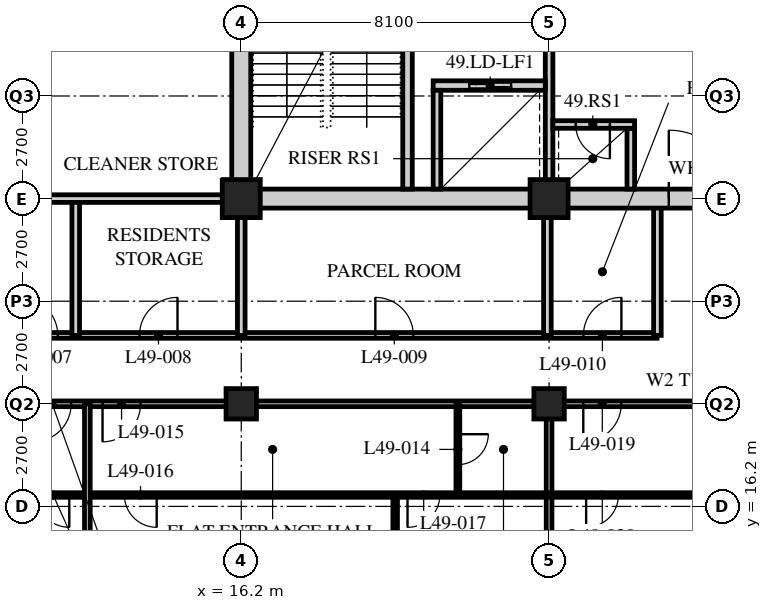
"""IFC4 building model, lengths in metres.
Left out: names, types, materials, properties, quantities, classifications, styles, units other than length and angle.
Written with IfcOpenShell. Run it as: python <this file> out.ifc"""

import sys

from ifc_helpers import new_model, si_unit, direction, frame, frame_2d, origin, origin_2d, place, context, subcontext, project, spatial, rectangle, hollow_rectangle, extrude, element, fill, save


model = new_model("IFC4")
c1 = context("Model", 3, precision=1e-05, world=origin(), true_north=direction((0.0, 1.0)))
c2 = subcontext(c1, "Body", "Model", "MODEL_VIEW")
j1 = project(units=[si_unit("LENGTHUNIT", "METRE"), si_unit("PLANEANGLEUNIT", "RADIAN")], contexts=[c1])
p1 = place(None, origin())
s1 = spatial("IfcSite", under=j1, at=p1, CompositionType="ELEMENT")
p2 = place(p1, origin())
s2 = spatial("IfcBuilding", under=s1, at=p2, CompositionType="ELEMENT")
p3 = place(p2, frame((0.0, 0.0, 192.0)))
s3 = spatial("IfcBuildingStorey", under=s2, at=p3, CompositionType="ELEMENT", Elevation=192.0)
p4 = place(p3, frame((16.2, 18.9, 0.0), z_axis=(0.0, 0.0, 1.0), x_axis=(1.0, 0.0, 0.0)))
e1 = element("IfcColumn", 1, at=p4, inside=s3, PredefinedType="COLUMN", context=c2, shape_type="SweptSolid", body=[
    extrude(hollow_rectangle(XDim=0.8, YDim=0.8, WallThickness=0.08, at=origin_2d()), origin(), (0.0, 0.0, 1.0), 3.6),
])
p5 = place(p3, frame((16.2, 24.3, 0.0), z_axis=(0.0, 0.0, 1.0), x_axis=(1.0, 0.0, 0.0)))
e2 = element("IfcColumn", 2, at=p5, inside=s3, PredefinedType="COLUMN", context=c2, shape_type="SweptSolid", body=[
    extrude(hollow_rectangle(XDim=1.0, YDim=1.0, WallThickness=0.1, at=origin_2d()), origin(), (0.0, 0.0, 1.0), 3.6),
])
p6 = place(p3, frame((24.3, 18.9, 0.0), z_axis=(0.0, 0.0, 1.0), x_axis=(1.0, 0.0, 0.0)))
e3 = element("IfcColumn", 3, at=p6, inside=s3, PredefinedType="COLUMN", context=c2, shape_type="SweptSolid", body=[
    extrude(hollow_rectangle(XDim=0.8, YDim=0.8, WallThickness=0.08, at=origin_2d()), origin(), (0.0, 0.0, 1.0), 3.6),
])
p7 = place(p3, frame((24.3, 24.3, 0.0), z_axis=(0.0, 0.0, 1.0), x_axis=(1.0, 0.0, 0.0)))
e4 = element("IfcColumn", 4, at=p7, inside=s3, PredefinedType="COLUMN", context=c2, shape_type="SweptSolid", body=[
    extrude(hollow_rectangle(XDim=1.0, YDim=1.0, WallThickness=0.1, at=origin_2d()), origin(), (0.0, 0.0, 1.0), 3.6),
])
p8 = place(p3, frame((8.1, 18.9, 0.0), z_axis=(0.0, 0.0, 1.0), x_axis=(1.0, 0.0, 0.0)))
e5 = element("IfcWall", 5, at=p8, inside=s3, PredefinedType="PARTITIONING", context=c2, shape_type="SweptSolid", body=[
    extrude(rectangle(XDim=40.5, YDim=0.15, at=frame_2d((20.25, 0.0))), origin(), (0.0, 0.0, 1.0), 2.778),
])
p9 = place(p8, frame((4.45, 0.0, 0.0)))
e6 = element("IfcOpeningElement", 6, at=p9, cuts=e5, PredefinedType="OPENING", context=c2, shape_type="SweptSolid", body=[
    extrude(rectangle(XDim=1.0, YDim=2.1, at=frame_2d((0.5, 1.05))), frame((0.0, 0.085, 0.0), z_axis=(0.0, -1.0, 0.0), x_axis=(1.0, 0.0, 0.0)), (0.0, 0.0, 1.0), 0.17),
])
p10 = place(p8, frame((17.1, 0.0, 0.0)))
e7 = element("IfcOpeningElement", 7, at=p10, cuts=e5, PredefinedType="OPENING", context=c2, shape_type="SweptSolid", body=[
    extrude(rectangle(XDim=1.0, YDim=2.1, at=frame_2d((0.5, 1.05))), frame((0.0, 0.085, 0.0), z_axis=(0.0, -1.0, 0.0), x_axis=(1.0, 0.0, 0.0)), (0.0, 0.0, 1.0), 0.17),
])
p11 = place(p8, frame((28.75, 0.0, 0.0)))
e8 = element("IfcOpeningElement", 8, at=p11, cuts=e5, PredefinedType="OPENING", context=c2, shape_type="SweptSolid", body=[
    extrude(rectangle(XDim=1.0, YDim=2.1, at=frame_2d((0.5, 1.05))), frame((0.0, 0.085, 0.0), z_axis=(0.0, -1.0, 0.0), x_axis=(1.0, 0.0, 0.0)), (0.0, 0.0, 1.0), 0.17),
])
p12 = place(p8, frame((2.625, 0.0, 0.0)))
e9 = element("IfcOpeningElement", 9, at=p12, cuts=e5, PredefinedType="OPENING", context=c2, shape_type="SweptSolid", body=[
    extrude(rectangle(XDim=1.0, YDim=2.1, at=frame_2d((0.5, 1.05))), frame((0.0, 0.085, 0.0), z_axis=(0.0, -1.0, 0.0), x_axis=(1.0, 0.0, 0.0)), (0.0, 0.0, 1.0), 0.17),
])
p13 = place(p8, frame((36.875, 0.0, 0.0)))
e10 = element("IfcOpeningElement", 10, at=p13, cuts=e5, PredefinedType="OPENING", context=c2, shape_type="SweptSolid", body=[
    extrude(rectangle(XDim=1.0, YDim=2.1, at=frame_2d((0.5, 1.05))), frame((0.0, 0.085, 0.0), z_axis=(0.0, -1.0, 0.0), x_axis=(1.0, 0.0, 0.0)), (0.0, 0.0, 1.0), 0.17),
])
p14 = place(p3, frame((9.9, 20.7, 0.0), z_axis=(0.0, 0.0, 1.0), x_axis=(1.0, 0.0, 0.0)))
e11 = element("IfcWall", 11, at=p14, inside=s3, PredefinedType="PARTITIONING", context=c2, shape_type="SweptSolid", body=[
    extrude(rectangle(XDim=17.24, YDim=0.15, at=frame_2d((8.62, 0.0))), origin(), (0.0, 0.0, 1.0), 3.39),
])
p15 = place(p14, frame((0.472, 0.0, 0.0)))
e12 = element("IfcOpeningElement", 12, at=p15, cuts=e11, PredefinedType="OPENING", context=c2, shape_type="SweptSolid", body=[
    extrude(rectangle(XDim=1.0, YDim=2.1, at=frame_2d((0.5, 1.05))), frame((0.0, 0.085, 0.0), z_axis=(0.0, -1.0, 0.0), x_axis=(1.0, 0.0, 0.0)), (0.0, 0.0, 1.0), 0.17),
])
p16 = place(p14, frame((3.622, 0.0, 0.0)))
e13 = element("IfcOpeningElement", 13, at=p16, cuts=e11, PredefinedType="OPENING", context=c2, shape_type="SweptSolid", body=[
    extrude(rectangle(XDim=1.0, YDim=2.1, at=frame_2d((0.5, 1.05))), frame((0.0, 0.085, 0.0), z_axis=(0.0, -1.0, 0.0), x_axis=(1.0, 0.0, 0.0)), (0.0, 0.0, 1.0), 0.17),
])
p17 = place(p14, frame((9.828, 0.0, 0.0)))
e14 = element("IfcOpeningElement", 14, at=p17, cuts=e11, PredefinedType="OPENING", context=c2, shape_type="SweptSolid", body=[
    extrude(rectangle(XDim=1.0, YDim=2.1, at=frame_2d((0.5, 1.05))), frame((0.0, 0.085, 0.0), z_axis=(0.0, -1.0, 0.0), x_axis=(1.0, 0.0, 0.0)), (0.0, 0.0, 1.0), 0.17),
])
p18 = place(p14, frame((15.303, 0.0, 0.0)))
e15 = element("IfcOpeningElement", 15, at=p18, cuts=e11, PredefinedType="OPENING", context=c2, shape_type="SweptSolid", body=[
    extrude(rectangle(XDim=1.0, YDim=2.1, at=frame_2d((0.5, 1.05))), frame((0.0, 0.085, 0.0), z_axis=(0.0, -1.0, 0.0), x_axis=(1.0, 0.0, 0.0)), (0.0, 0.0, 1.0), 0.17),
])
p19 = place(p3, frame((16.2, 20.7, 0.0), z_axis=(0.0, 0.0, 1.0), x_axis=(0.0, 1.0, 0.0)))
e16 = element("IfcWall", 16, at=p19, inside=s3, PredefinedType="SOLIDWALL", context=c2, shape_type="SweptSolid", body=[
    extrude(rectangle(XDim=3.6, YDim=0.2, at=frame_2d((1.8, 0.0))), origin(), (0.0, 0.0, 1.0), 2.778),
])
p20 = place(p3, frame((11.844, 20.7, 0.0), z_axis=(0.0, 0.0, 1.0), x_axis=(0.0, 1.0, 0.0)))
e17 = element("IfcWall", 17, at=p20, inside=s3, PredefinedType="SOLIDWALL", context=c2, shape_type="SweptSolid", body=[
    extrude(rectangle(XDim=3.6, YDim=0.2, at=frame_2d((1.8, 0.0))), origin(), (0.0, 0.0, 1.0), 3.39),
])
p21 = place(p3, frame((24.256, 20.7, 0.0), z_axis=(0.0, 0.0, 1.0), x_axis=(0.0, 1.0, 0.0)))
e18 = element("IfcWall", 18, at=p21, inside=s3, PredefinedType="SOLIDWALL", context=c2, shape_type="SweptSolid", body=[
    extrude(rectangle(XDim=3.6, YDim=0.2, at=frame_2d((1.8, 0.0))), origin(), (0.0, 0.0, 1.0), 2.778),
])
p22 = place(p3, frame((27.15, 20.7, 0.0), z_axis=(0.0, 0.0, 1.0), x_axis=(0.0, 1.0, 0.0)))
e19 = element("IfcWall", 19, at=p22, inside=s3, PredefinedType="SOLIDWALL", context=c2, shape_type="SweptSolid", body=[
    extrude(rectangle(XDim=3.6, YDim=0.2, at=frame_2d((1.8, 0.0))), origin(), (0.0, 0.0, 1.0), 3.39),
])
p23 = place(p3, frame((9.9, 24.3, 0.0), z_axis=(0.0, 0.0, 1.0), x_axis=(1.0, 0.0, 0.0)))
e20 = element("IfcWall", 20, at=p23, inside=s3, PredefinedType="SOLIDWALL", context=c2, shape_type="SweptSolid", body=[
    extrude(rectangle(XDim=6.3, YDim=0.2, at=frame_2d((3.15, 0.0))), origin(), (0.0, 0.0, 1.0), 3.39),
])
p24 = place(p3, frame((21.9, 18.9, 0.0), z_axis=(0.0, 0.0, 1.0), x_axis=(0.0, -1.0, 0.0)))
e21 = element("IfcWall", 21, at=p24, inside=s3, PredefinedType="PARTITIONING", context=c2, shape_type="SweptSolid", body=[
    extrude(rectangle(XDim=2.4, YDim=0.1, at=frame_2d((1.2, 0.0))), origin(), (0.0, 0.0, 1.0), 3.39),
])
p25 = place(p24, frame((0.8, 0.0, 0.0)))
e22 = element("IfcOpeningElement", 22, at=p25, cuts=e21, PredefinedType="OPENING", context=c2, shape_type="SweptSolid", body=[
    extrude(rectangle(XDim=0.8, YDim=2.1, at=frame_2d((0.4, 1.05))), frame((0.0, 0.06, 0.0), z_axis=(0.0, -1.0, 0.0), x_axis=(1.0, 0.0, 0.0)), (0.0, 0.0, 1.0), 0.12),
])
p26 = place(p3, frame((20.25, 16.5, 0.0), z_axis=(0.0, 0.0, 1.0), x_axis=(0.0, -1.0, 0.0)))
e23 = element("IfcWall", 23, at=p26, inside=s3, PredefinedType="PARTITIONING", context=c2, shape_type="SweptSolid", body=[
    extrude(rectangle(XDim=5.4, YDim=0.12, at=frame_2d((2.7, 0.0))), origin(), (0.0, 0.0, 1.0), 3.39),
])
p27 = place(p3, frame((24.3, 18.9, 0.0), z_axis=(0.0, 0.0, 1.0), x_axis=(0.0, -1.0, 0.0)))
e24 = element("IfcWall", 24, at=p27, inside=s3, PredefinedType="PARTITIONING", context=c2, shape_type="SweptSolid", body=[
    extrude(rectangle(XDim=7.8, YDim=0.15, at=frame_2d((3.9, 0.0))), origin(), (0.0, 0.0, 1.0), 2.778),
])
p28 = place(p3, frame((8.1, 16.5, 0.0), z_axis=(0.0, 0.0, 1.0), x_axis=(1.0, 0.0, 0.0)))
e25 = element("IfcWall", 25, at=p28, inside=s3, PredefinedType="PARTITIONING", context=c2, shape_type="SweptSolid", body=[
    extrude(rectangle(XDim=40.5, YDim=0.12, at=frame_2d((20.25, 0.0))), origin(), (0.0, 0.0, 1.0), 3.39),
])
p29 = place(p28, frame((5.025, 0.0, 0.0)))
e26 = element("IfcOpeningElement", 26, at=p29, cuts=e25, PredefinedType="OPENING", context=c2, shape_type="SweptSolid", body=[
    extrude(rectangle(XDim=0.85, YDim=2.1, at=frame_2d((0.425, 1.05))), frame((0.0, 0.07, 0.0), z_axis=(0.0, -1.0, 0.0), x_axis=(1.0, 0.0, 0.0)), (0.0, 0.0, 1.0), 0.14),
])
p30 = place(p28, frame((12.475, 0.0, 0.0)))
e27 = element("IfcOpeningElement", 27, at=p30, cuts=e25, PredefinedType="OPENING", context=c2, shape_type="SweptSolid", body=[
    extrude(rectangle(XDim=0.85, YDim=2.1, at=frame_2d((0.425, 1.05))), frame((0.0, 0.07, 0.0), z_axis=(0.0, -1.0, 0.0), x_axis=(1.0, 0.0, 0.0)), (0.0, 0.0, 1.0), 0.14),
])
p31 = place(p28, frame((17.175, 0.0, 0.0)))
e28 = element("IfcOpeningElement", 28, at=p31, cuts=e25, PredefinedType="OPENING", context=c2, shape_type="SweptSolid", body=[
    extrude(rectangle(XDim=0.85, YDim=2.1, at=frame_2d((0.425, 1.05))), frame((0.0, 0.07, 0.0), z_axis=(0.0, -1.0, 0.0), x_axis=(1.0, 0.0, 0.0)), (0.0, 0.0, 1.0), 0.14),
])
p32 = place(p28, frame((24.625, 0.0, 0.0)))
e29 = element("IfcOpeningElement", 29, at=p32, cuts=e25, PredefinedType="OPENING", context=c2, shape_type="SweptSolid", body=[
    extrude(rectangle(XDim=0.85, YDim=2.1, at=frame_2d((0.425, 1.05))), frame((0.0, 0.07, 0.0), z_axis=(0.0, -1.0, 0.0), x_axis=(1.0, 0.0, 0.0)), (0.0, 0.0, 1.0), 0.14),
])
p33 = place(p28, frame((29.325, 0.0, 0.0)))
e30 = element("IfcOpeningElement", 30, at=p33, cuts=e25, PredefinedType="OPENING", context=c2, shape_type="SweptSolid", body=[
    extrude(rectangle(XDim=0.85, YDim=2.1, at=frame_2d((0.425, 1.05))), frame((0.0, 0.07, 0.0), z_axis=(0.0, -1.0, 0.0), x_axis=(1.0, 0.0, 0.0)), (0.0, 0.0, 1.0), 0.14),
])
p34 = place(p28, frame((32.725, 0.0, 0.0)))
e31 = element("IfcOpeningElement", 31, at=p34, cuts=e25, PredefinedType="OPENING", context=c2, shape_type="SweptSolid", body=[
    extrude(rectangle(XDim=0.85, YDim=2.1, at=frame_2d((0.425, 1.05))), frame((0.0, 0.07, 0.0), z_axis=(0.0, -1.0, 0.0), x_axis=(1.0, 0.0, 0.0)), (0.0, 0.0, 1.0), 0.14),
])
p35 = place(p28, frame((2.725, 0.0, 0.0)))
e32 = element("IfcOpeningElement", 32, at=p35, cuts=e25, PredefinedType="OPENING", context=c2, shape_type="SweptSolid", body=[
    extrude(rectangle(XDim=0.85, YDim=2.1, at=frame_2d((0.425, 1.05))), frame((0.0, 0.07, 0.0), z_axis=(0.0, -1.0, 0.0), x_axis=(1.0, 0.0, 0.0)), (0.0, 0.0, 1.0), 0.14),
])
p36 = place(p28, frame((36.925, 0.0, 0.0)))
e33 = element("IfcOpeningElement", 33, at=p36, cuts=e25, PredefinedType="OPENING", context=c2, shape_type="SweptSolid", body=[
    extrude(rectangle(XDim=0.85, YDim=2.1, at=frame_2d((0.425, 1.05))), frame((0.0, 0.07, 0.0), z_axis=(0.0, -1.0, 0.0), x_axis=(1.0, 0.0, 0.0)), (0.0, 0.0, 1.0), 0.14),
])
p37 = place(p3, frame((12.15, 18.9, 0.0), z_axis=(0.0, 0.0, 1.0), x_axis=(0.0, -1.0, 0.0)))
e34 = element("IfcWall", 34, at=p37, inside=s3, PredefinedType="PARTITIONING", context=c2, shape_type="SweptSolid", body=[
    extrude(rectangle(XDim=7.8, YDim=0.15, at=frame_2d((3.9, 0.0))), origin(), (0.0, 0.0, 1.0), 3.39),
])
p38 = place(p3, frame((15.95, 24.3, 0.0), z_axis=(0.0, 0.0, 1.0), x_axis=(1.0, 0.0, 0.0)))
e35 = element("IfcWall", 35, at=p38, inside=s3, PredefinedType="SOLIDWALL", context=c2, shape_type="SweptSolid", body=[
    extrude(rectangle(XDim=24.8, YDim=0.5, at=frame_2d((12.4, 0.0))), origin(), (0.0, 0.0, 1.0), 2.74),
])
p39 = place(p38, frame((11.5, 0.0, 0.0)))
e36 = element("IfcOpeningElement", 36, at=p39, cuts=e35, PredefinedType="OPENING", context=c2, shape_type="SweptSolid", body=[
    extrude(rectangle(XDim=1.8, YDim=2.4, at=frame_2d((0.9, 1.2))), frame((0.0, 0.26, 0.0), z_axis=(0.0, -1.0, 0.0), x_axis=(1.0, 0.0, 0.0)), (0.0, 0.0, 1.0), 0.52),
])
p40 = place(p3, frame((16.2, 24.55, 0.0), z_axis=(0.0, 0.0, 1.0), x_axis=(0.0, 1.0, 0.0)))
e37 = element("IfcWall", 37, at=p40, inside=s3, PredefinedType="SOLIDWALL", context=c2, shape_type="SweptSolid", body=[
    extrude(rectangle(XDim=15.7, YDim=0.5, at=frame_2d((7.85, 0.0))), origin(), (0.0, 0.0, 1.0), 2.778),
])
p41 = place(p3, frame((24.3, 24.55, 0.0), z_axis=(0.0, 0.0, 1.0), x_axis=(0.0, 1.0, 0.0)))
e38 = element("IfcWall", 38, at=p41, inside=s3, PredefinedType="SOLIDWALL", context=c2, shape_type="SweptSolid", body=[
    extrude(rectangle(XDim=7.75, YDim=0.2, at=frame_2d((3.875, 0.0))), origin(), (0.0, 0.0, 1.0), 2.778),
])
p42 = place(p41, frame((4.6, 0.0, 0.0)))
e39 = element("IfcOpeningElement", 39, at=p42, cuts=e38, PredefinedType="OPENING", context=c2, shape_type="SweptSolid", body=[
    extrude(rectangle(XDim=1.2, YDim=2.1, at=frame_2d((0.6, 1.05))), frame((0.0, 0.11, 0.0), z_axis=(0.0, -1.0, 0.0), x_axis=(1.0, 0.0, 0.0)), (0.0, 0.0, 1.0), 0.22),
])
p43 = place(p3, frame((20.575, 24.55, 0.0), z_axis=(0.0, 0.0, 1.0), x_axis=(0.0, 1.0, 0.0)))
e40 = element("IfcWall", 40, at=p43, inside=s3, PredefinedType="SOLIDWALL", context=c2, shape_type="SweptSolid", body=[
    extrude(rectangle(XDim=7.75, YDim=0.25, at=frame_2d((3.875, 0.0))), origin(), (0.0, 0.0, 1.0), 3.39),
])
p44 = place(p43, frame((6.2, 0.0, 0.0)))
e41 = element("IfcOpeningElement", 41, at=p44, cuts=e40, PredefinedType="OPENING", context=c2, shape_type="SweptSolid", body=[
    extrude(rectangle(XDim=1.2, YDim=2.1, at=frame_2d((0.6, 1.05))), frame((0.0, 0.135, 0.0), z_axis=(0.0, -1.0, 0.0), x_axis=(1.0, 0.0, 0.0)), (0.0, 0.0, 1.0), 0.27),
])
p45 = place(p3, frame((21.25, 27.275, 0.0), z_axis=(0.0, 0.0, 1.0), x_axis=(1.0, 0.0, 0.0)))
e42 = element("IfcWall", 42, at=p45, inside=s3, PredefinedType="SOLIDWALL", context=c2, shape_type="SweptSolid", body=[
    extrude(rectangle(XDim=2.95, YDim=0.25, at=frame_2d((1.475, 0.0))), origin(), (0.0, 0.0, 1.0), 3.39),
])
p46 = place(p45, frame((0.95, 0.0, 0.0)))
e43 = element("IfcOpeningElement", 43, at=p46, cuts=e42, PredefinedType="OPENING", context=c2, shape_type="SweptSolid", body=[
    extrude(rectangle(XDim=1.1, YDim=2.4, at=frame_2d((0.55, 1.2))), frame((0.0, 0.135, 0.0), z_axis=(0.0, -1.0, 0.0), x_axis=(1.0, 0.0, 0.0)), (0.0, 0.0, 1.0), 0.27),
])
p47 = place(p3, frame((21.35, 24.55, 0.0), z_axis=(0.0, 0.0, 1.0), x_axis=(0.0, 1.0, 0.0)))
e44 = element("IfcWall", 44, at=p47, inside=s3, PredefinedType="SOLIDWALL", context=c2, shape_type="SweptSolid", body=[
    extrude(rectangle(XDim=2.6, YDim=0.2, at=frame_2d((1.3, 0.0))), origin(), (0.0, 0.0, 1.0), 3.39),
])
p48 = place(p3, frame((26.45, 24.55, 0.0), z_axis=(0.0, 0.0, 1.0), x_axis=(0.0, 1.0, 0.0)))
e45 = element("IfcWall", 45, at=p48, inside=s3, PredefinedType="SOLIDWALL", context=c2, shape_type="SweptSolid", body=[
    extrude(rectangle(XDim=1.6, YDim=0.2, at=frame_2d((0.8, 0.0))), origin(), (0.0, 0.0, 1.0), 3.39),
])
p49 = place(p3, frame((24.4, 26.25, 0.0), z_axis=(0.0, 0.0, 1.0), x_axis=(1.0, 0.0, 0.0)))
e46 = element("IfcWall", 46, at=p49, inside=s3, PredefinedType="SOLIDWALL", context=c2, shape_type="SweptSolid", body=[
    extrude(rectangle(XDim=2.15, YDim=0.2, at=frame_2d((1.075, 0.0))), origin(), (0.0, 0.0, 1.0), 3.39),
])
p50 = place(p49, frame((0.6, 0.0, 0.0)))
e47 = element("IfcOpeningElement", 47, at=p50, cuts=e46, PredefinedType="OPENING", context=c2, shape_type="SweptSolid", body=[
    extrude(rectangle(XDim=0.9, YDim=2.1, at=frame_2d((0.45, 1.05))), frame((0.0, 0.11, 0.0), z_axis=(0.0, -1.0, 0.0), x_axis=(1.0, 0.0, 0.0)), (0.0, 0.0, 1.0), 0.22),
])
p51 = place(p15, origin())
e48 = element("IfcDoor", 48, at=p51, inside=s3, OperationType="SINGLE_SWING_LEFT", PredefinedType="DOOR", context=c2, shape_type="SweptSolid", body=[
    extrude(rectangle(XDim=1.0, YDim=2.1, at=frame_2d((0.5, 1.05))), frame((0.0, 0.025, 0.0), z_axis=(0.0, -1.0, 0.0), x_axis=(1.0, 0.0, 0.0)), (0.0, 0.0, 1.0), 0.05),
])
fill(e12, e48)
p52 = place(p16, origin())
e49 = element("IfcDoor", 49, at=p52, inside=s3, OperationType="SINGLE_SWING_RIGHT", PredefinedType="DOOR", context=c2, shape_type="SweptSolid", body=[
    extrude(rectangle(XDim=1.0, YDim=2.1, at=frame_2d((0.5, 1.05))), frame((0.0, 0.025, 0.0), z_axis=(0.0, -1.0, 0.0), x_axis=(1.0, 0.0, 0.0)), (0.0, 0.0, 1.0), 0.05),
])
fill(e13, e49)
p53 = place(p17, origin())
e50 = element("IfcDoor", 50, at=p53, inside=s3, OperationType="SINGLE_SWING_LEFT", PredefinedType="DOOR", context=c2, shape_type="SweptSolid", body=[
    extrude(rectangle(XDim=1.0, YDim=2.1, at=frame_2d((0.5, 1.05))), frame((0.0, 0.025, 0.0), z_axis=(0.0, -1.0, 0.0), x_axis=(1.0, 0.0, 0.0)), (0.0, 0.0, 1.0), 0.05),
])
fill(e14, e50)
p54 = place(p18, origin())
e51 = element("IfcDoor", 51, at=p54, inside=s3, OperationType="SINGLE_SWING_RIGHT", PredefinedType="DOOR", context=c2, shape_type="SweptSolid", body=[
    extrude(rectangle(XDim=1.0, YDim=2.1, at=frame_2d((0.5, 1.05))), frame((0.0, 0.025, 0.0), z_axis=(0.0, -1.0, 0.0), x_axis=(1.0, 0.0, 0.0)), (0.0, 0.0, 1.0), 0.05),
])
fill(e15, e51)
p55 = place(p25, origin())
e52 = element("IfcDoor", 52, at=p55, inside=s3, OperationType="SINGLE_SWING_LEFT", PredefinedType="DOOR", context=c2, shape_type="SweptSolid", body=[
    extrude(rectangle(XDim=0.8, YDim=2.1, at=frame_2d((0.4, 1.05))), frame((0.0, 0.025, 0.0), z_axis=(0.0, -1.0, 0.0), x_axis=(1.0, 0.0, 0.0)), (0.0, 0.0, 1.0), 0.05),
])
fill(e22, e52)
p56 = place(p9, origin())
e53 = element("IfcDoor", 53, at=p56, inside=s3, OperationType="SINGLE_SWING_RIGHT", PredefinedType="DOOR", context=c2, shape_type="SweptSolid", body=[
    extrude(rectangle(XDim=1.0, YDim=2.1, at=frame_2d((0.5, 1.05))), frame((0.0, 0.025, 0.0), z_axis=(0.0, -1.0, 0.0), x_axis=(1.0, 0.0, 0.0)), (0.0, 0.0, 1.0), 0.05),
])
fill(e6, e53)
p57 = place(p29, origin())
e54 = element("IfcDoor", 54, at=p57, inside=s3, OperationType="SINGLE_SWING_LEFT", PredefinedType="DOOR", context=c2, shape_type="SweptSolid", body=[
    extrude(rectangle(XDim=0.85, YDim=2.1, at=frame_2d((0.425, 1.05))), frame((0.0, 0.025, 0.0), z_axis=(0.0, -1.0, 0.0), x_axis=(1.0, 0.0, 0.0)), (0.0, 0.0, 1.0), 0.05),
])
fill(e26, e54)
p58 = place(p30, origin())
e55 = element("IfcDoor", 55, at=p58, inside=s3, OperationType="SINGLE_SWING_RIGHT", PredefinedType="DOOR", context=c2, shape_type="SweptSolid", body=[
    extrude(rectangle(XDim=0.85, YDim=2.1, at=frame_2d((0.425, 1.05))), frame((0.0, 0.025, 0.0), z_axis=(0.0, -1.0, 0.0), x_axis=(1.0, 0.0, 0.0)), (0.0, 0.0, 1.0), 0.05),
])
fill(e27, e55)
p59 = place(p10, origin())
e56 = element("IfcDoor", 56, at=p59, inside=s3, OperationType="SINGLE_SWING_RIGHT", PredefinedType="DOOR", context=c2, shape_type="SweptSolid", body=[
    extrude(rectangle(XDim=1.0, YDim=2.1, at=frame_2d((0.5, 1.05))), frame((0.0, 0.025, 0.0), z_axis=(0.0, -1.0, 0.0), x_axis=(1.0, 0.0, 0.0)), (0.0, 0.0, 1.0), 0.05),
])
fill(e7, e56)
p60 = place(p31, origin())
e57 = element("IfcDoor", 57, at=p60, inside=s3, OperationType="SINGLE_SWING_RIGHT", PredefinedType="DOOR", context=c2, shape_type="SweptSolid", body=[
    extrude(rectangle(XDim=0.85, YDim=2.1, at=frame_2d((0.425, 1.05))), frame((0.0, 0.025, 0.0), z_axis=(0.0, -1.0, 0.0), x_axis=(1.0, 0.0, 0.0)), (0.0, 0.0, 1.0), 0.05),
])
fill(e28, e57)
p61 = place(p12, origin())
e58 = element("IfcDoor", 58, at=p61, inside=s3, OperationType="SINGLE_SWING_RIGHT", PredefinedType="DOOR", context=c2, shape_type="SweptSolid", body=[
    extrude(rectangle(XDim=1.0, YDim=2.1, at=frame_2d((0.5, 1.05))), frame((0.0, 0.025, 0.0), z_axis=(0.0, -1.0, 0.0), x_axis=(1.0, 0.0, 0.0)), (0.0, 0.0, 1.0), 0.05),
])
fill(e9, e58)
p62 = place(p35, origin())
e59 = element("IfcDoor", 59, at=p62, inside=s3, OperationType="SINGLE_SWING_LEFT", PredefinedType="DOOR", context=c2, shape_type="SweptSolid", body=[
    extrude(rectangle(XDim=0.85, YDim=2.1, at=frame_2d((0.425, 1.05))), frame((0.0, 0.025, 0.0), z_axis=(0.0, -1.0, 0.0), x_axis=(1.0, 0.0, 0.0)), (0.0, 0.0, 1.0), 0.05),
])
fill(e32, e59)
p63 = place(p50, origin())
e60 = element("IfcDoor", 60, at=p63, inside=s3, OperationType="SINGLE_SWING_LEFT", PredefinedType="DOOR", context=c2, shape_type="SweptSolid", body=[
    extrude(rectangle(XDim=0.9, YDim=2.1, at=frame_2d((0.45, 1.05))), frame((0.0, 0.025, 0.0), z_axis=(0.0, -1.0, 0.0), x_axis=(1.0, 0.0, 0.0)), (0.0, 0.0, 1.0), 0.05),
])
fill(e47, e60)
p64 = place(p46, origin())
e61 = element("IfcDoor", 61, at=p64, inside=s3, OperationType="DOUBLE_DOOR_SLIDING", PredefinedType="DOOR", context=c2, shape_type="SweptSolid", body=[
    extrude(rectangle(XDim=1.1, YDim=2.4, at=frame_2d((0.55, 1.2))), frame((0.0, 0.025, 0.0), z_axis=(0.0, -1.0, 0.0), x_axis=(1.0, 0.0, 0.0)), (0.0, 0.0, 1.0), 0.05),
])
fill(e43, e61)
p65 = place(p39, origin())
e62 = element("IfcDoor", 62, at=p65, inside=s3, OperationType="DOUBLE_DOOR_SINGLE_SWING", PredefinedType="DOOR", context=c2, shape_type="SweptSolid", body=[
    extrude(rectangle(XDim=1.8, YDim=2.4, at=frame_2d((0.9, 1.2))), frame((0.0, 0.025, 0.0), z_axis=(0.0, -1.0, 0.0), x_axis=(1.0, 0.0, 0.0)), (0.0, 0.0, 1.0), 0.05),
])
fill(e36, e62)
save(model, sys.argv[1])
